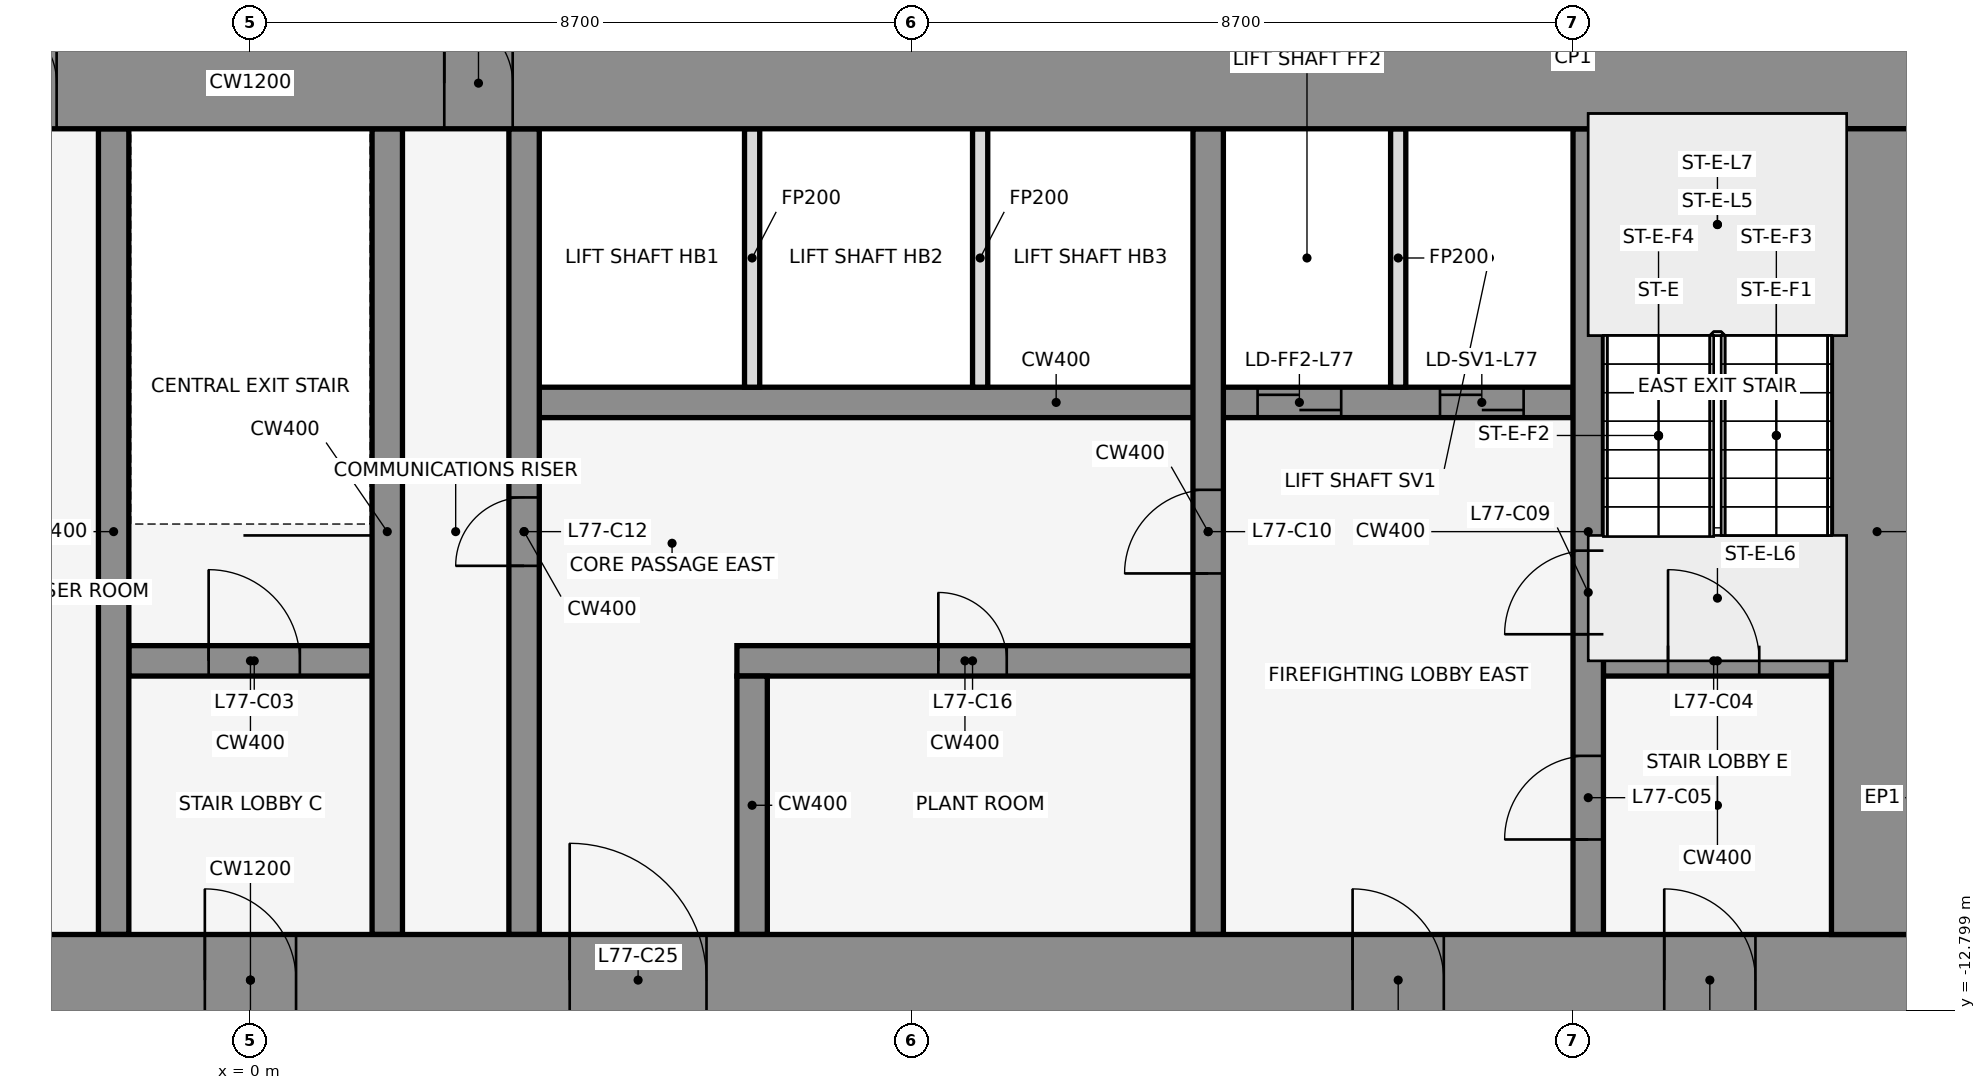
"""IFC4 building model, lengths in metres.
Left out: names, types, materials, properties, quantities, classifications, styles, units other than length and angle.
Written with IfcOpenShell. Run it as: python <this file> out.ifc"""

import sys

from ifc_helpers import new_model, si_unit, direction, frame, frame_2d, origin, place, context, subcontext, project, spatial, rectangle, extrude, element, fill, save


model = new_model("IFC4")
c1 = context("Model", 3, precision=1e-05, world=origin(), true_north=direction((0.0, 1.0)))
c2 = subcontext(c1, "Body", "Model", "MODEL_VIEW")
j1 = project(units=[si_unit("LENGTHUNIT", "METRE"), si_unit("PLANEANGLEUNIT", "RADIAN")], contexts=[c1])
p1 = place(None, origin())
s1 = spatial("IfcSite", under=j1, at=p1, CompositionType="ELEMENT")
p2 = place(p1, origin())
s2 = spatial("IfcBuilding", under=s1, at=p2, CompositionType="ELEMENT")
p3 = place(p2, frame((0.0, 0.0, 342.5)))
s3 = spatial("IfcBuildingStorey", under=s2, at=p3, CompositionType="ELEMENT", Elevation=342.5)
for number, where, z_axis, x_axis in (
    (1, (16.432, -0.105, 0.0), (0.0, 0.0, 1.0), (-0.84, 0.543, 0.0)),
    (2, (1.901, 1.08, 0.0), (0.0, 0.0, 1.0), (-0.84, -0.543, 0.0)),
    (3, (-0.068, -0.105, 0.0), (0.0, 0.0, 1.0), (-0.84, 0.543, 0.0)),
):
    element("IfcWall", number, at=place(p3, frame(where, z_axis=z_axis, x_axis=x_axis)), inside=s3, PredefinedType="STANDARD", context=c2, shape_type="SweptSolid", body=[
        extrude(rectangle(XDim=2.183, YDim=0.25, at=frame_2d((1.091, 0.0))), origin(), (0.0, 0.0, 1.0), 5.2),
    ])
p4 = place(p3, frame((-1.6, -8.2, 0.0), z_axis=(0.0, 0.0, 1.0), x_axis=(1.0, 0.0, 0.0)))
e4 = element("IfcWall", 4, at=p4, inside=s3, PredefinedType="SHEAR", context=c2, shape_type="SweptSolid", body=[
    extrude(rectangle(XDim=3.2, YDim=0.4, at=frame_2d((1.6, 0.0))), origin(), (0.0, 0.0, 1.0), 5.4),
])
p5 = place(p4, frame((1.05, 0.0, 0.0)))
e5 = element("IfcOpeningElement", 5, at=p5, cuts=e4, PredefinedType="OPENING", context=c2, shape_type="SweptSolid", body=[
    extrude(rectangle(XDim=1.2, YDim=2.1, at=frame_2d((0.6, 1.05))), frame((0.0, 0.212, 0.0), z_axis=(0.0, -1.0, 0.0), x_axis=(1.0, 0.0, 0.0)), (0.0, 0.0, 1.0), 0.424),
])
p6 = place(p3, frame((6.4, -8.2, 0.0), z_axis=(0.0, 0.0, 1.0), x_axis=(1.0, 0.0, 0.0)))
e6 = element("IfcWall", 6, at=p6, inside=s3, PredefinedType="SHEAR", context=c2, shape_type="SweptSolid", body=[
    extrude(rectangle(XDim=6.0, YDim=0.4, at=frame_2d((3.0, 0.0))), origin(), (0.0, 0.0, 1.0), 5.4),
])
p7 = place(p6, frame((2.65, 0.0, 0.0)))
e7 = element("IfcOpeningElement", 7, at=p7, cuts=e6, PredefinedType="OPENING", context=c2, shape_type="SweptSolid", body=[
    extrude(rectangle(XDim=0.9, YDim=2.1, at=frame_2d((0.45, 1.05))), frame((0.0, 0.212, 0.0), z_axis=(0.0, -1.0, 0.0), x_axis=(1.0, 0.0, 0.0)), (0.0, 0.0, 1.0), 0.424),
])
p8 = place(p3, frame((17.8, -8.2, 0.0), z_axis=(0.0, 0.0, 1.0), x_axis=(1.0, 0.0, 0.0)))
e8 = element("IfcWall", 8, at=p8, inside=s3, PredefinedType="SHEAR", context=c2, shape_type="SweptSolid", body=[
    extrude(rectangle(XDim=3.0, YDim=0.4, at=frame_2d((1.5, 0.0))), origin(), (0.0, 0.0, 1.0), 5.4),
])
p9 = place(p8, frame((0.85, 0.0, 0.0)))
e9 = element("IfcOpeningElement", 9, at=p9, cuts=e8, PredefinedType="OPENING", context=c2, shape_type="SweptSolid", body=[
    extrude(rectangle(XDim=1.2, YDim=2.1, at=frame_2d((0.6, 1.05))), frame((0.0, 0.212, 0.0), z_axis=(0.0, -1.0, 0.0), x_axis=(1.0, 0.0, 0.0)), (0.0, 0.0, 1.0), 0.424),
])
p10 = place(p3, frame((3.8, -4.8, 0.0), z_axis=(0.0, 0.0, 1.0), x_axis=(1.0, 0.0, 0.0)))
e10 = element("IfcWall", 10, at=p10, inside=s3, PredefinedType="SHEAR", context=c2, shape_type="SweptSolid", body=[
    extrude(rectangle(XDim=13.6, YDim=0.4, at=frame_2d((6.8, 0.0))), origin(), (0.0, 0.0, 1.0), 5.4),
])
p11 = place(p10, frame((9.45, 0.0, 0.0)))
e11 = element("IfcOpeningElement", 11, at=p11, cuts=e10, PredefinedType="OPENING", context=c2, shape_type="SweptSolid", body=[
    extrude(rectangle(XDim=1.1, YDim=2.1, at=frame_2d((0.55, 1.05))), frame((0.0, 0.212, 0.0), z_axis=(0.0, -1.0, 0.0), x_axis=(1.0, 0.0, 0.0)), (0.0, 0.0, 1.0), 0.424),
])
p12 = place(p10, frame((11.85, 0.0, 0.0)))
e12 = element("IfcOpeningElement", 12, at=p12, cuts=e10, PredefinedType="OPENING", context=c2, shape_type="SweptSolid", body=[
    extrude(rectangle(XDim=1.1, YDim=2.1, at=frame_2d((0.55, 1.05))), frame((0.0, 0.212, 0.0), z_axis=(0.0, -1.0, 0.0), x_axis=(1.0, 0.0, 0.0)), (0.0, 0.0, 1.0), 0.424),
])
for number, where, z_axis, x_axis in (
    (13, (-1.8, -11.8, 0.0), (0.0, 0.0, 1.0), (0.0, 1.0, 0.0)),
    (14, (1.8, -11.8, 0.0), (0.0, 0.0, 1.0), (0.0, 1.0, 0.0)),
):
    element("IfcWall", number, at=place(p3, frame(where, z_axis=z_axis, x_axis=x_axis)), inside=s3, PredefinedType="SHEAR", context=c2, shape_type="SweptSolid", body=[
        extrude(rectangle(XDim=10.6, YDim=0.4, at=frame_2d((5.3, 0.0))), origin(), (0.0, 0.0, 1.0), 5.4),
    ])
p13 = place(p3, frame((3.6, -11.8, 0.0), z_axis=(0.0, 0.0, 1.0), x_axis=(0.0, 1.0, 0.0)))
e15 = element("IfcWall", 15, at=p13, inside=s3, PredefinedType="SHEAR", context=c2, shape_type="SweptSolid", body=[
    extrude(rectangle(XDim=10.6, YDim=0.4, at=frame_2d((5.3, 0.0))), origin(), (0.0, 0.0, 1.0), 5.4),
])
p14 = place(p13, frame((4.85, 0.0, 0.0)))
e16 = element("IfcOpeningElement", 16, at=p14, cuts=e15, PredefinedType="OPENING", context=c2, shape_type="SweptSolid", body=[
    extrude(rectangle(XDim=0.9, YDim=2.1, at=frame_2d((0.45, 1.05))), frame((0.0, 0.212, 0.0), z_axis=(0.0, -1.0, 0.0), x_axis=(1.0, 0.0, 0.0)), (0.0, 0.0, 1.0), 0.424),
])
p15 = place(p3, frame((6.6, -11.8, 0.0), z_axis=(0.0, 0.0, 1.0), x_axis=(0.0, 1.0, 0.0)))
e17 = element("IfcWall", 17, at=p15, inside=s3, PredefinedType="SHEAR", context=c2, shape_type="SweptSolid", body=[
    extrude(rectangle(XDim=3.4, YDim=0.4, at=frame_2d((1.7, 0.0))), origin(), (0.0, 0.0, 1.0), 5.4),
])
for number, where, z_axis, x_axis in (
    (18, (6.6, -4.6, 0.0), (0.0, 0.0, 1.0), (0.0, 1.0, 0.0)),
    (19, (9.6, -4.6, 0.0), (0.0, 0.0, 1.0), (0.0, 1.0, 0.0)),
):
    element("IfcWall", number, at=place(p3, frame(where, z_axis=z_axis, x_axis=x_axis)), inside=s3, PredefinedType="PARTITIONING", context=c2, shape_type="SweptSolid", body=[
        extrude(rectangle(XDim=3.4, YDim=0.2, at=frame_2d((1.7, 0.0))), origin(), (0.0, 0.0, 1.0), 4.268),
    ])
p16 = place(p3, frame((12.6, -11.8, 0.0), z_axis=(0.0, 0.0, 1.0), x_axis=(0.0, 1.0, 0.0)))
e20 = element("IfcWall", 20, at=p16, inside=s3, PredefinedType="SHEAR", context=c2, shape_type="SweptSolid", body=[
    extrude(rectangle(XDim=10.6, YDim=0.4, at=frame_2d((5.3, 0.0))), origin(), (0.0, 0.0, 1.0), 5.4),
])
p17 = place(p16, frame((4.75, 0.0, 0.0)))
e21 = element("IfcOpeningElement", 21, at=p17, cuts=e20, PredefinedType="OPENING", context=c2, shape_type="SweptSolid", body=[
    extrude(rectangle(XDim=1.1, YDim=2.1, at=frame_2d((0.55, 1.05))), frame((0.0, 0.212, 0.0), z_axis=(0.0, -1.0, 0.0), x_axis=(1.0, 0.0, 0.0)), (0.0, 0.0, 1.0), 0.424),
])
p18 = place(p3, frame((15.1, -4.6, 0.0), z_axis=(0.0, 0.0, 1.0), x_axis=(0.0, 1.0, 0.0)))
e22 = element("IfcWall", 22, at=p18, inside=s3, PredefinedType="PARTITIONING", context=c2, shape_type="SweptSolid", body=[
    extrude(rectangle(XDim=3.4, YDim=0.2, at=frame_2d((1.7, 0.0))), origin(), (0.0, 0.0, 1.0), 4.268),
])
p19 = place(p3, frame((17.6, -11.8, 0.0), z_axis=(0.0, 0.0, 1.0), x_axis=(0.0, 1.0, 0.0)))
e23 = element("IfcWall", 23, at=p19, inside=s3, PredefinedType="SHEAR", context=c2, shape_type="SweptSolid", body=[
    extrude(rectangle(XDim=10.6, YDim=0.4, at=frame_2d((5.3, 0.0))), origin(), (0.0, 0.0, 1.0), 5.4),
])
p20 = place(p19, frame((1.25, 0.0, 0.0)))
e24 = element("IfcOpeningElement", 24, at=p20, cuts=e23, PredefinedType="OPENING", context=c2, shape_type="SweptSolid", body=[
    extrude(rectangle(XDim=1.1, YDim=2.1, at=frame_2d((0.55, 1.05))), frame((0.0, 0.212, 0.0), z_axis=(0.0, -1.0, 0.0), x_axis=(1.0, 0.0, 0.0)), (0.0, 0.0, 1.0), 0.424),
])
p21 = place(p19, frame((3.95, 0.0, 0.0)))
e25 = element("IfcOpeningElement", 25, at=p21, cuts=e23, PredefinedType="OPENING", context=c2, shape_type="SweptSolid", body=[
    extrude(rectangle(XDim=1.1, YDim=2.1, at=frame_2d((0.55, 1.05))), frame((0.0, 0.212, 0.0), z_axis=(0.0, -1.0, 0.0), x_axis=(1.0, 0.0, 0.0)), (0.0, 0.0, 1.0), 0.424),
])
p22 = place(p3, frame((-22.0, -0.6, 0.0), z_axis=(0.0, 0.0, 1.0), x_axis=(1.0, 0.0, 0.0)))
e26 = element("IfcWall", 26, at=p22, inside=s3, PredefinedType="SHEAR", context=c2, shape_type="SweptSolid", body=[
    extrude(rectangle(XDim=44.0, YDim=1.2, at=frame_2d((22.0, 0.0))), origin(), (0.0, 0.0, 1.0), 5.4),
])
p23 = place(p22, frame((18.55, 0.0, 0.0)))
e27 = element("IfcOpeningElement", 27, at=p23, cuts=e26, PredefinedType="OPENING", context=c2, shape_type="SweptSolid", body=[
    extrude(rectangle(XDim=0.9, YDim=2.1, at=frame_2d((0.45, 1.05))), frame((0.0, 0.612, 0.0), z_axis=(0.0, -1.0, 0.0), x_axis=(1.0, 0.0, 0.0)), (0.0, 0.0, 1.0), 1.224),
])
p24 = place(p22, frame((24.55, 0.0, 0.0)))
e28 = element("IfcOpeningElement", 28, at=p24, cuts=e26, PredefinedType="OPENING", context=c2, shape_type="SweptSolid", body=[
    extrude(rectangle(XDim=0.9, YDim=2.1, at=frame_2d((0.45, 1.05))), frame((0.0, 0.612, 0.0), z_axis=(0.0, -1.0, 0.0), x_axis=(1.0, 0.0, 0.0)), (0.0, 0.0, 1.0), 1.224),
])
p25 = place(p3, frame((-22.0, -12.4, 0.0), z_axis=(0.0, 0.0, 1.0), x_axis=(1.0, 0.0, 0.0)))
e29 = element("IfcWall", 29, at=p25, inside=s3, PredefinedType="SHEAR", context=c2, shape_type="SweptSolid", body=[
    extrude(rectangle(XDim=44.0, YDim=1.2, at=frame_2d((22.0, 0.0))), origin(), (0.0, 0.0, 1.0), 5.4),
])
p26 = place(p25, frame((2.2, 0.0, 0.0)))
e30 = element("IfcOpeningElement", 30, at=p26, cuts=e29, PredefinedType="OPENING", context=c2, shape_type="SweptSolid", body=[
    extrude(rectangle(XDim=1.2, YDim=2.1, at=frame_2d((0.6, 1.05))), frame((0.0, 0.612, 0.0), z_axis=(0.0, -1.0, 0.0), x_axis=(1.0, 0.0, 0.0)), (0.0, 0.0, 1.0), 1.224),
])
p27 = place(p25, frame((21.4, 0.0, 0.0)))
e31 = element("IfcOpeningElement", 31, at=p27, cuts=e29, PredefinedType="OPENING", context=c2, shape_type="SweptSolid", body=[
    extrude(rectangle(XDim=1.2, YDim=2.1, at=frame_2d((0.6, 1.05))), frame((0.0, 0.612, 0.0), z_axis=(0.0, -1.0, 0.0), x_axis=(1.0, 0.0, 0.0)), (0.0, 0.0, 1.0), 1.224),
])
p28 = place(p25, frame((40.6, 0.0, 0.0)))
e32 = element("IfcOpeningElement", 32, at=p28, cuts=e29, PredefinedType="OPENING", context=c2, shape_type="SweptSolid", body=[
    extrude(rectangle(XDim=1.2, YDim=2.1, at=frame_2d((0.6, 1.05))), frame((0.0, 0.612, 0.0), z_axis=(0.0, -1.0, 0.0), x_axis=(1.0, 0.0, 0.0)), (0.0, 0.0, 1.0), 1.224),
])
p29 = place(p25, frame((10.75, 0.0, 0.0)))
e33 = element("IfcOpeningElement", 33, at=p29, cuts=e29, PredefinedType="OPENING", context=c2, shape_type="SweptSolid", body=[
    extrude(rectangle(XDim=1.2, YDim=2.1, at=frame_2d((0.6, 1.05))), frame((0.0, 0.612, 0.0), z_axis=(0.0, -1.0, 0.0), x_axis=(1.0, 0.0, 0.0)), (0.0, 0.0, 1.0), 1.224),
])
p30 = place(p25, frame((16.0, 0.0, 0.0)))
e34 = element("IfcOpeningElement", 34, at=p30, cuts=e29, PredefinedType="OPENING", context=c2, shape_type="SweptSolid", body=[
    extrude(rectangle(XDim=1.8, YDim=2.1, at=frame_2d((0.9, 1.05))), frame((0.0, 0.612, 0.0), z_axis=(0.0, -1.0, 0.0), x_axis=(1.0, 0.0, 0.0)), (0.0, 0.0, 1.0), 1.224),
])
p31 = place(p25, frame((6.3, 0.0, 0.0)))
e35 = element("IfcOpeningElement", 35, at=p31, cuts=e29, PredefinedType="OPENING", context=c2, shape_type="SweptSolid", body=[
    extrude(rectangle(XDim=1.2, YDim=2.1, at=frame_2d((0.6, 1.05))), frame((0.0, 0.612, 0.0), z_axis=(0.0, -1.0, 0.0), x_axis=(1.0, 0.0, 0.0)), (0.0, 0.0, 1.0), 1.224),
])
p32 = place(p25, frame((26.2, 0.0, 0.0)))
e36 = element("IfcOpeningElement", 36, at=p32, cuts=e29, PredefinedType="OPENING", context=c2, shape_type="SweptSolid", body=[
    extrude(rectangle(XDim=1.8, YDim=2.1, at=frame_2d((0.9, 1.05))), frame((0.0, 0.612, 0.0), z_axis=(0.0, -1.0, 0.0), x_axis=(1.0, 0.0, 0.0)), (0.0, 0.0, 1.0), 1.224),
])
p33 = place(p25, frame((36.5, 0.0, 0.0)))
e37 = element("IfcOpeningElement", 37, at=p33, cuts=e29, PredefinedType="OPENING", context=c2, shape_type="SweptSolid", body=[
    extrude(rectangle(XDim=1.2, YDim=2.1, at=frame_2d((0.6, 1.05))), frame((0.0, 0.612, 0.0), z_axis=(0.0, -1.0, 0.0), x_axis=(1.0, 0.0, 0.0)), (0.0, 0.0, 1.0), 1.224),
])
p34 = place(p3, frame((21.4, -11.8, 0.0), z_axis=(0.0, 0.0, 1.0), x_axis=(0.0, 1.0, 0.0)))
e38 = element("IfcWall", 38, at=p34, inside=s3, PredefinedType="SHEAR", context=c2, shape_type="SweptSolid", body=[
    extrude(rectangle(XDim=10.6, YDim=1.2, at=frame_2d((5.3, 0.0))), origin(), (0.0, 0.0, 1.0), 5.4),
])
p35 = place(p5, origin())
e39 = element("IfcDoor", 39, at=p35, inside=s3, OperationType="SINGLE_SWING_LEFT", PredefinedType="DOOR", context=c2, shape_type="SweptSolid", body=[
    extrude(rectangle(XDim=1.2, YDim=2.1, at=frame_2d((0.6, 1.05))), frame((0.0, 0.025, 0.0), z_axis=(0.0, -1.0, 0.0), x_axis=(1.0, 0.0, 0.0)), (0.0, 0.0, 1.0), 0.05),
])
fill(e5, e39)
p36 = place(p9, origin())
e40 = element("IfcDoor", 40, at=p36, inside=s3, OperationType="SINGLE_SWING_RIGHT", PredefinedType="DOOR", context=c2, shape_type="SweptSolid", body=[
    extrude(rectangle(XDim=1.2, YDim=2.1, at=frame_2d((0.6, 1.05))), frame((0.0, 0.025, 0.0), z_axis=(0.0, -1.0, 0.0), x_axis=(1.0, 0.0, 0.0)), (0.0, 0.0, 1.0), 0.05),
])
fill(e9, e40)
p37 = place(p20, origin())
e41 = element("IfcDoor", 41, at=p37, inside=s3, OperationType="SINGLE_SWING_LEFT", PredefinedType="DOOR", context=c2, shape_type="SweptSolid", body=[
    extrude(rectangle(XDim=1.1, YDim=2.1, at=frame_2d((0.55, 1.05))), frame((0.0, 0.025, 0.0), z_axis=(0.0, -1.0, 0.0), x_axis=(1.0, 0.0, 0.0)), (0.0, 0.0, 1.0), 0.05),
])
fill(e24, e41)
p38 = place(p11, origin())
e42 = element("IfcDoor", 42, at=p38, inside=s3, OperationType="DOUBLE_DOOR_SLIDING", PredefinedType="DOOR", context=c2, shape_type="SweptSolid", body=[
    extrude(rectangle(XDim=1.1, YDim=2.1, at=frame_2d((0.55, 1.05))), frame((0.0, 0.025, 0.0), z_axis=(0.0, -1.0, 0.0), x_axis=(1.0, 0.0, 0.0)), (0.0, 0.0, 1.0), 0.05),
])
fill(e11, e42)
p39 = place(p12, origin())
e43 = element("IfcDoor", 43, at=p39, inside=s3, OperationType="DOUBLE_DOOR_SLIDING", PredefinedType="DOOR", context=c2, shape_type="SweptSolid", body=[
    extrude(rectangle(XDim=1.1, YDim=2.1, at=frame_2d((0.55, 1.05))), frame((0.0, 0.025, 0.0), z_axis=(0.0, -1.0, 0.0), x_axis=(1.0, 0.0, 0.0)), (0.0, 0.0, 1.0), 0.05),
])
fill(e12, e43)
p40 = place(p21, origin())
e44 = element("IfcDoor", 44, at=p40, inside=s3, OperationType="SINGLE_SWING_LEFT", PredefinedType="DOOR", context=c2, shape_type="SweptSolid", body=[
    extrude(rectangle(XDim=1.1, YDim=2.1, at=frame_2d((0.55, 1.05))), frame((0.0, 0.025, 0.0), z_axis=(0.0, -1.0, 0.0), x_axis=(1.0, 0.0, 0.0)), (0.0, 0.0, 1.0), 0.05),
])
fill(e25, e44)
p41 = place(p17, frame((1.1, 0.0, 0.0), z_axis=(0.0, 0.0, 1.0), x_axis=(-1.0, 0.0, 0.0)))
e45 = element("IfcDoor", 45, at=p41, inside=s3, OperationType="SINGLE_SWING_LEFT", PredefinedType="DOOR", context=c2, shape_type="SweptSolid", body=[
    extrude(rectangle(XDim=1.1, YDim=2.1, at=frame_2d((0.55, 1.05))), frame((0.0, 0.025, 0.0), z_axis=(0.0, -1.0, 0.0), x_axis=(1.0, 0.0, 0.0)), (0.0, 0.0, 1.0), 0.05),
])
fill(e21, e45)
p42 = place(p14, origin())
e46 = element("IfcDoor", 46, at=p42, inside=s3, OperationType="SINGLE_SWING_RIGHT", PredefinedType="DOOR", context=c2, shape_type="SweptSolid", body=[
    extrude(rectangle(XDim=0.9, YDim=2.1, at=frame_2d((0.45, 1.05))), frame((0.0, 0.025, 0.0), z_axis=(0.0, -1.0, 0.0), x_axis=(1.0, 0.0, 0.0)), (0.0, 0.0, 1.0), 0.05),
])
fill(e16, e46)
p43 = place(p7, frame((0.9, 0.0, 0.0), z_axis=(0.0, 0.0, 1.0), x_axis=(-1.0, 0.0, 0.0)))
e47 = element("IfcDoor", 47, at=p43, inside=s3, OperationType="SINGLE_SWING_LEFT", PredefinedType="DOOR", context=c2, shape_type="SweptSolid", body=[
    extrude(rectangle(XDim=0.9, YDim=2.1, at=frame_2d((0.45, 1.05))), frame((0.0, 0.025, 0.0), z_axis=(0.0, -1.0, 0.0), x_axis=(1.0, 0.0, 0.0)), (0.0, 0.0, 1.0), 0.05),
])
fill(e7, e47)
p44 = place(p23, origin())
e48 = element("IfcDoor", 48, at=p44, inside=s3, OperationType="SINGLE_SWING_LEFT", PredefinedType="DOOR", context=c2, shape_type="SweptSolid", body=[
    extrude(rectangle(XDim=0.9, YDim=2.1, at=frame_2d((0.45, 1.05))), frame((0.0, 0.025, 0.0), z_axis=(0.0, -1.0, 0.0), x_axis=(1.0, 0.0, 0.0)), (0.0, 0.0, 1.0), 0.05),
])
fill(e27, e48)
p45 = place(p24, origin())
e49 = element("IfcDoor", 49, at=p45, inside=s3, OperationType="SINGLE_SWING_LEFT", PredefinedType="DOOR", context=c2, shape_type="SweptSolid", body=[
    extrude(rectangle(XDim=0.9, YDim=2.1, at=frame_2d((0.45, 1.05))), frame((0.0, 0.025, 0.0), z_axis=(0.0, -1.0, 0.0), x_axis=(1.0, 0.0, 0.0)), (0.0, 0.0, 1.0), 0.05),
])
fill(e28, e49)
p46 = place(p27, frame((1.2, 0.0, 0.0), z_axis=(0.0, 0.0, 1.0), x_axis=(-1.0, 0.0, 0.0)))
e50 = element("IfcDoor", 50, at=p46, inside=s3, OperationType="SINGLE_SWING_RIGHT", PredefinedType="DOOR", context=c2, shape_type="SweptSolid", body=[
    extrude(rectangle(XDim=1.2, YDim=2.1, at=frame_2d((0.6, 1.05))), frame((0.0, 0.025, 0.0), z_axis=(0.0, -1.0, 0.0), x_axis=(1.0, 0.0, 0.0)), (0.0, 0.0, 1.0), 0.05),
])
fill(e31, e50)
p47 = place(p28, frame((1.2, 0.0, 0.0), z_axis=(0.0, 0.0, 1.0), x_axis=(-1.0, 0.0, 0.0)))
e51 = element("IfcDoor", 51, at=p47, inside=s3, OperationType="SINGLE_SWING_RIGHT", PredefinedType="DOOR", context=c2, shape_type="SweptSolid", body=[
    extrude(rectangle(XDim=1.2, YDim=2.1, at=frame_2d((0.6, 1.05))), frame((0.0, 0.025, 0.0), z_axis=(0.0, -1.0, 0.0), x_axis=(1.0, 0.0, 0.0)), (0.0, 0.0, 1.0), 0.05),
])
fill(e32, e51)
p48 = place(p32, origin())
e52 = element("IfcDoor", 52, at=p48, inside=s3, OperationType="SINGLE_SWING_LEFT", PredefinedType="DOOR", context=c2, shape_type="SweptSolid", body=[
    extrude(rectangle(XDim=1.8, YDim=2.1, at=frame_2d((0.9, 1.05))), frame((0.0, 0.025, 0.0), z_axis=(0.0, -1.0, 0.0), x_axis=(1.0, 0.0, 0.0)), (0.0, 0.0, 1.0), 0.05),
])
fill(e36, e52)
p49 = place(p33, frame((1.2, 0.0, 0.0), z_axis=(0.0, 0.0, 1.0), x_axis=(-1.0, 0.0, 0.0)))
e53 = element("IfcDoor", 53, at=p49, inside=s3, OperationType="SINGLE_SWING_RIGHT", PredefinedType="DOOR", context=c2, shape_type="SweptSolid", body=[
    extrude(rectangle(XDim=1.2, YDim=2.1, at=frame_2d((0.6, 1.05))), frame((0.0, 0.025, 0.0), z_axis=(0.0, -1.0, 0.0), x_axis=(1.0, 0.0, 0.0)), (0.0, 0.0, 1.0), 0.05),
])
fill(e37, e53)
save(model, sys.argv[1])
